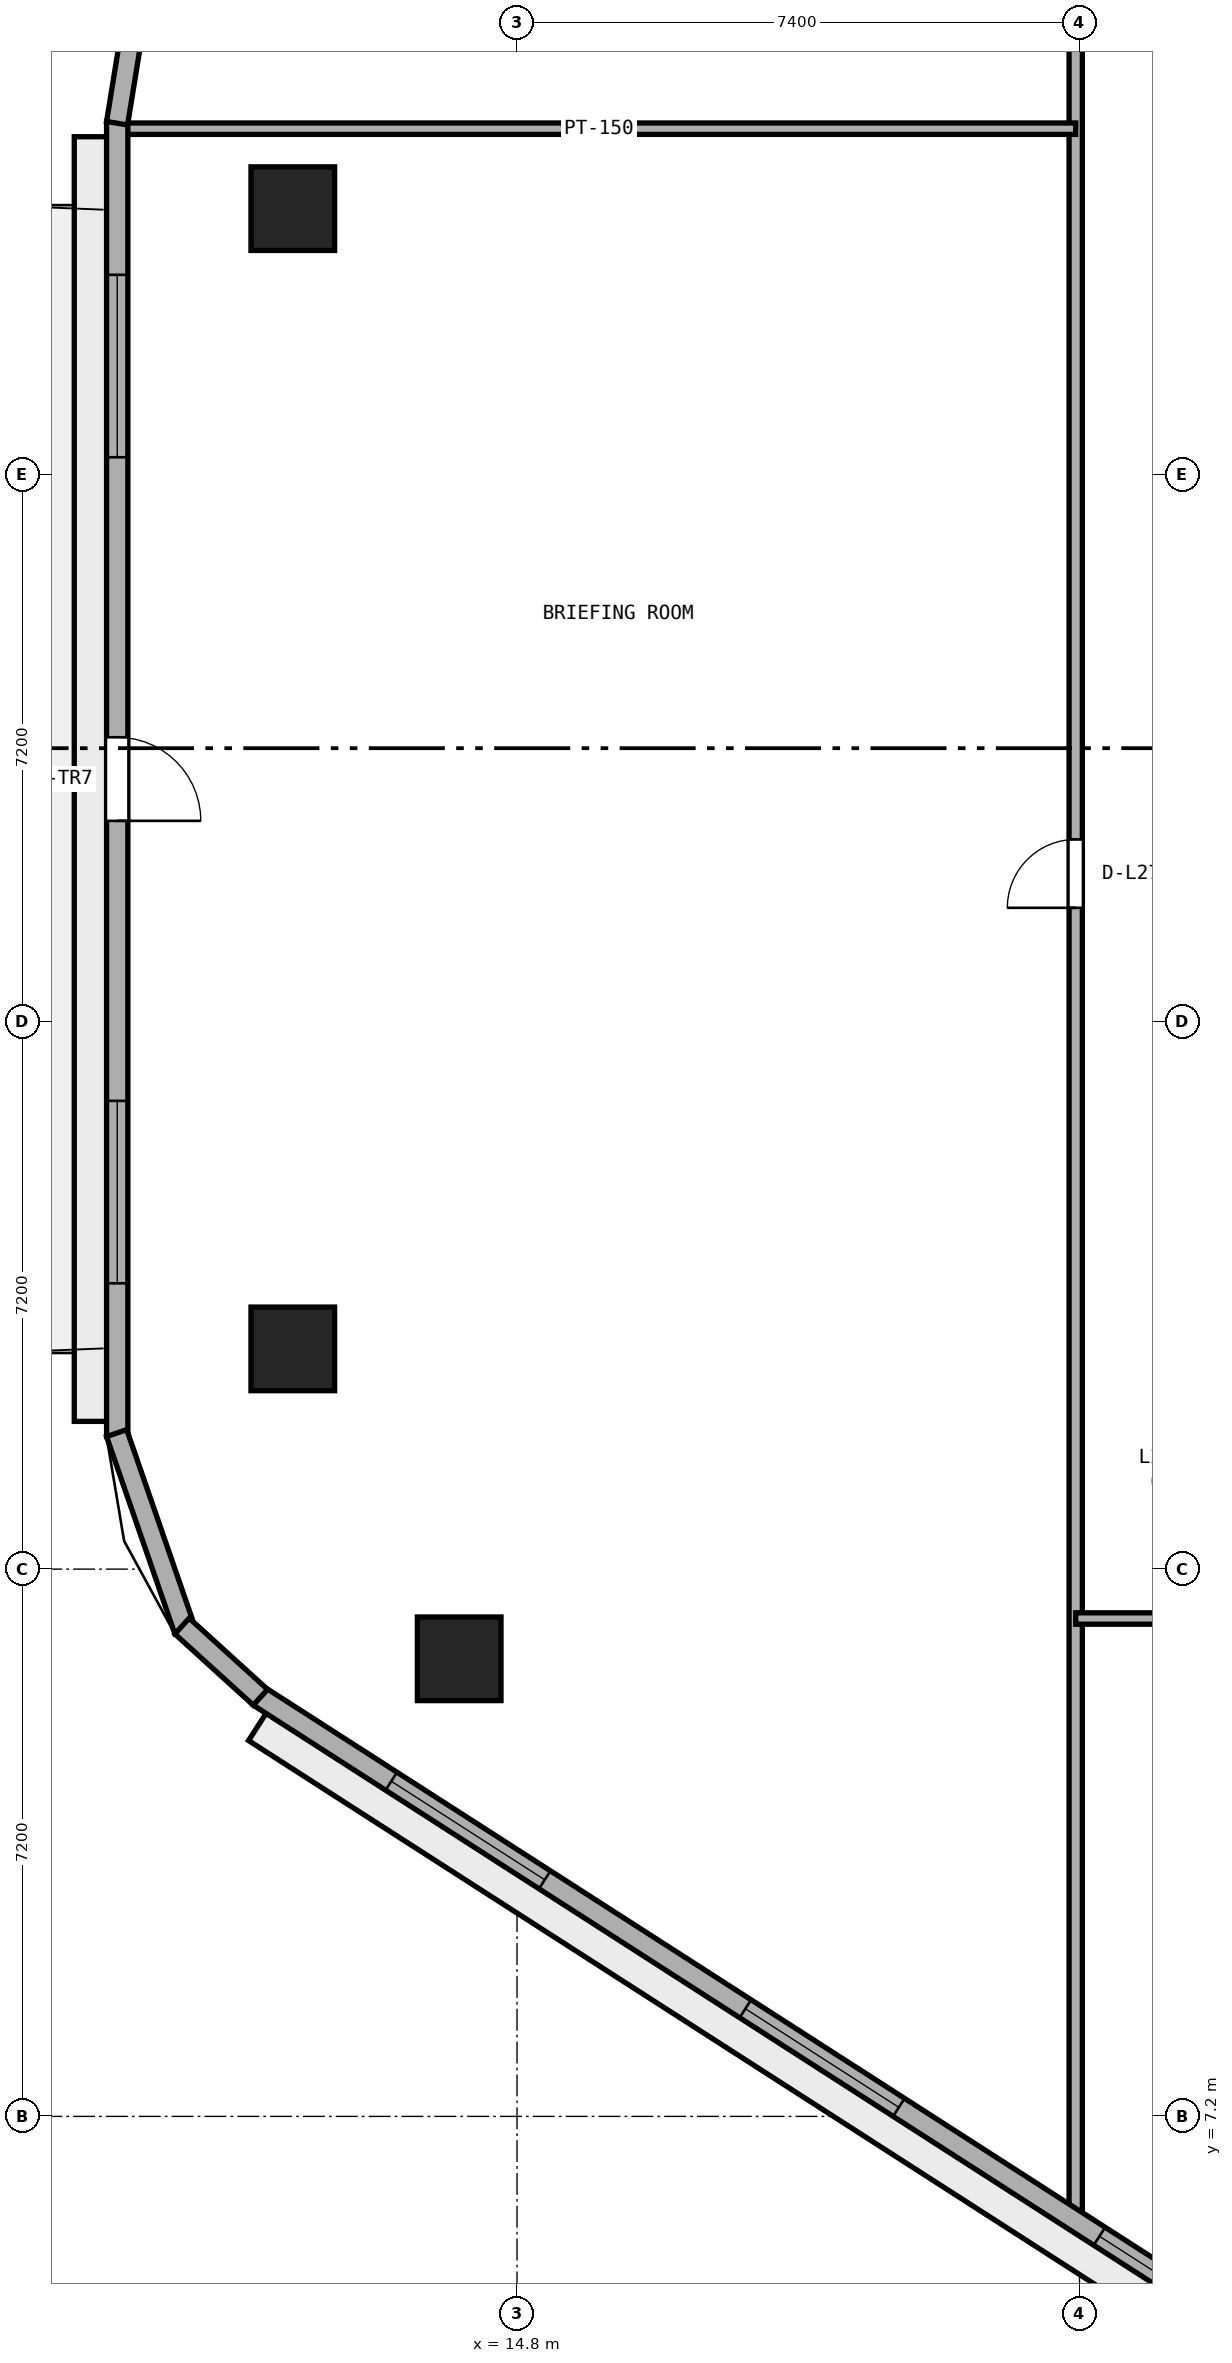
"""IFC4 building model, lengths in metres.
Left out: names, types, materials, properties, quantities, classifications, styles, units other than length and angle.
Written with IfcOpenShell. Run it as: python <this file> out.ifc"""

import sys

from ifc_helpers import new_model, si_unit, direction, frame, frame_2d, origin, origin_2d, place, context, subcontext, project, spatial, rectangle, extrude, element, fill, save


model = new_model("IFC4")
c1 = context("Model", 3, precision=1e-05, world=origin(), true_north=direction((0.0, 1.0)))
c2 = subcontext(c1, "Body", "Model", "MODEL_VIEW")
j1 = project(units=[si_unit("LENGTHUNIT", "METRE"), si_unit("PLANEANGLEUNIT", "RADIAN")], contexts=[c1])
p1 = place(None, origin())
s1 = spatial("IfcSite", under=j1, at=p1, CompositionType="ELEMENT")
p2 = place(p1, origin())
s2 = spatial("IfcBuilding", under=s1, at=p2, CompositionType="ELEMENT")
p3 = place(p2, frame((0.0, 0.0, 108.6)))
s3 = spatial("IfcBuildingStorey", under=s2, at=p3, CompositionType="ELEMENT", Elevation=108.6)
for number, where, z_axis, x_axis in (
    (1, (11.85, 32.298, 0.0), (0.0, 0.0, 1.0), (1.0, 0.0, 0.0)),
    (2, (11.85, 17.298, 0.0), (0.0, 0.0, 1.0), (1.0, 0.0, 0.0)),
    (3, (14.039, 13.22, 0.0), (0.0, 0.0, 1.0), (1.0, 0.0, 0.0)),
):
    element("IfcColumn", number, at=place(p3, frame(where, z_axis=z_axis, x_axis=x_axis)), inside=s3, PredefinedType="COLUMN", context=c2, shape_type="SweptSolid", body=[
        extrude(rectangle(XDim=1.1, YDim=1.1, at=origin_2d()), origin(), (0.0, 0.0, 1.0), 3.8),
    ])
p4 = place(p3, frame((22.15, 5.798, 0.0), z_axis=(0.0, 0.0, 1.0), x_axis=(0.0, 1.0, 0.0)))
e4 = element("IfcWall", 4, at=p4, inside=s3, PredefinedType="PARTITIONING", context=c2, shape_type="SweptSolid", body=[
    extrude(rectangle(XDim=30.852, YDim=0.175, at=frame_2d((15.426, 0.0))), origin(), (0.0, 0.0, 1.0), 3.525),
])
p5 = place(p4, frame((17.302, 0.0, 0.0)))
e5 = element("IfcOpeningElement", 5, at=p5, cuts=e4, PredefinedType="OPENING", context=c2, shape_type="SweptSolid", body=[
    extrude(rectangle(XDim=0.9, YDim=2.1, at=frame_2d((0.45, 1.05))), frame((0.0, 0.097, 0.0), z_axis=(0.0, -1.0, 0.0), x_axis=(1.0, 0.0, 0.0)), (0.0, 0.0, 1.0), 0.195),
])
p6 = place(p3, frame((22.15, 13.75, 0.0), z_axis=(0.0, 0.0, 1.0), x_axis=(1.0, 0.0, 0.0)))
e6 = element("IfcWall", 6, at=p6, inside=s3, PredefinedType="PARTITIONING", context=c2, shape_type="SweptSolid", body=[
    extrude(rectangle(XDim=29.7, YDim=0.15, at=frame_2d((14.85, 0.0))), origin(), (0.0, 0.0, 1.0), 3.525),
])
p7 = place(p6, frame((4.145, 0.0, 0.0)))
e7 = element("IfcOpeningElement", 7, at=p7, cuts=e6, PredefinedType="OPENING", context=c2, shape_type="SweptSolid", body=[
    extrude(rectangle(XDim=1.0, YDim=2.12, at=frame_2d((0.5, 1.06))), frame((0.0, 0.085, 0.0), z_axis=(0.0, -1.0, 0.0), x_axis=(1.0, 0.0, 0.0)), (0.0, 0.0, 1.0), 0.17),
])
p8 = place(p6, frame((18.755, 0.0, 0.0)))
e8 = element("IfcOpeningElement", 8, at=p8, cuts=e6, PredefinedType="OPENING", context=c2, shape_type="SweptSolid", body=[
    extrude(rectangle(XDim=1.0, YDim=2.12, at=frame_2d((0.5, 1.06))), frame((0.0, 0.085, 0.0), z_axis=(0.0, -1.0, 0.0), x_axis=(1.0, 0.0, 0.0)), (0.0, 0.0, 1.0), 0.17),
])
p9 = place(p3, frame((9.605, 33.35, 0.0), z_axis=(0.0, 0.0, 1.0), x_axis=(1.0, 0.0, 0.0)))
e9 = element("IfcWall", 9, at=p9, inside=s3, PredefinedType="PARTITIONING", context=c2, shape_type="SweptSolid", body=[
    extrude(rectangle(XDim=12.545, YDim=0.15, at=frame_2d((6.272, 0.0))), origin(), (0.0, 0.0, 1.0), 3.525),
])
p10 = place(p3, frame((9.54, 33.444, 0.0), z_axis=(0.0, 0.0, 1.0), x_axis=(0.0, -1.0, 0.0)))
e10 = element("IfcWall", 10, at=p10, inside=s3, PredefinedType="STANDARD", context=c2, shape_type="SweptSolid", body=[
    extrude(rectangle(XDim=17.301, YDim=0.28, at=frame_2d((8.65, 0.0))), origin(), (0.0, 0.0, 1.0), 3.525),
])
p11 = place(p10, frame((8.1, 0.0, 0.0)))
e11 = element("IfcOpeningElement", 11, at=p11, cuts=e10, PredefinedType="OPENING", context=c2, shape_type="SweptSolid", body=[
    extrude(rectangle(XDim=1.1, YDim=2.2, at=frame_2d((0.55, 1.1))), frame((0.0, 0.15, 0.0), z_axis=(0.0, -1.0, 0.0), x_axis=(1.0, 0.0, 0.0)), (0.0, 0.0, 1.0), 0.3),
])
p12 = place(p10, frame((2.017, 0.0, 0.9)))
e12 = element("IfcOpeningElement", 12, at=p12, cuts=e10, PredefinedType="OPENING", context=c2, shape_type="SweptSolid", body=[
    extrude(rectangle(XDim=2.4, YDim=1.75, at=frame_2d((1.2, 0.875))), frame((0.0, 0.15, 0.0), z_axis=(0.0, -1.0, 0.0), x_axis=(1.0, 0.0, 0.0)), (0.0, 0.0, 1.0), 0.3),
])
p13 = place(p10, frame((12.884, 0.0, 0.9)))
e13 = element("IfcOpeningElement", 13, at=p13, cuts=e10, PredefinedType="OPENING", context=c2, shape_type="SweptSolid", body=[
    extrude(rectangle(XDim=2.4, YDim=1.75, at=frame_2d((1.2, 0.875))), frame((0.0, 0.15, 0.0), z_axis=(0.0, -1.0, 0.0), x_axis=(1.0, 0.0, 0.0)), (0.0, 0.0, 1.0), 0.3),
])
p14 = place(p3, frame((11.405, 12.728, 0.0), z_axis=(0.0, 0.0, 1.0), x_axis=(0.841304564637, -0.540561402175, 0.0)))
e14 = element("IfcWall", 14, at=p14, inside=s3, PredefinedType="STANDARD", context=c2, shape_type="SweptSolid", body=[
    extrude(rectangle(XDim=17.612, YDim=0.28, at=frame_2d((8.806, 0.0))), origin(), (0.0, 0.0, 1.0), 3.525),
])
p15 = place(p14, frame((2.069, 0.0, 0.9)))
e15 = element("IfcOpeningElement", 15, at=p15, cuts=e14, PredefinedType="OPENING", context=c2, shape_type="SweptSolid", body=[
    extrude(rectangle(XDim=2.4, YDim=1.75, at=frame_2d((1.2, 0.875))), frame((0.0, 0.15, 0.0), z_axis=(0.0, -1.0, 0.0), x_axis=(1.0, 0.0, 0.0)), (0.0, 0.0, 1.0), 0.3),
])
p16 = place(p14, frame((7.606, 0.0, 0.9)))
e16 = element("IfcOpeningElement", 16, at=p16, cuts=e14, PredefinedType="OPENING", context=c2, shape_type="SweptSolid", body=[
    extrude(rectangle(XDim=2.4, YDim=1.75, at=frame_2d((1.2, 0.875))), frame((0.0, 0.15, 0.0), z_axis=(0.0, -1.0, 0.0), x_axis=(1.0, 0.0, 0.0)), (0.0, 0.0, 1.0), 0.3),
])
p17 = place(p14, frame((13.143, 0.0, 0.9)))
e17 = element("IfcOpeningElement", 17, at=p17, cuts=e14, PredefinedType="OPENING", context=c2, shape_type="SweptSolid", body=[
    extrude(rectangle(XDim=2.4, YDim=1.75, at=frame_2d((1.2, 0.875))), frame((0.0, 0.15, 0.0), z_axis=(0.0, -1.0, 0.0), x_axis=(1.0, 0.0, 0.0)), (0.0, 0.0, 1.0), 0.3),
])
p18 = place(p3, frame((9.753, 34.749, 0.0), z_axis=(0.0, 0.0, 1.0), x_axis=(-0.160037671962, -0.987110907423, 0.0)))
e18 = element("IfcWall", 18, at=p18, inside=s3, PredefinedType="STANDARD", context=c2, shape_type="SweptSolid", body=[
    extrude(rectangle(XDim=1.344, YDim=0.28, at=frame_2d((0.672, 0.0))), origin(), (0.0, 0.0, 1.0), 3.525),
])
p19 = place(p3, frame((9.532, 16.189, 0.0), z_axis=(0.0, 0.0, 1.0), x_axis=(0.32708309668, -0.944995580871, 0.0)))
e19 = element("IfcWall", 19, at=p19, inside=s3, PredefinedType="STANDARD", context=c2, shape_type="SweptSolid", body=[
    extrude(rectangle(XDim=2.748, YDim=0.28, at=frame_2d((1.374, 0.0))), origin(), (0.0, 0.0, 1.0), 3.525),
])
p20 = place(p3, frame((10.393, 13.651, 0.0), z_axis=(0.0, 0.0, 1.0), x_axis=(0.74003521851, -0.672568119498, 0.0)))
e20 = element("IfcWall", 20, at=p20, inside=s3, PredefinedType="STANDARD", context=c2, shape_type="SweptSolid", body=[
    extrude(rectangle(XDim=1.393, YDim=0.28, at=frame_2d((0.697, 0.0))), origin(), (0.0, 0.0, 1.0), 3.525),
])
p21 = place(p5, origin())
e21 = element("IfcDoor", 21, at=p21, inside=s3, OperationType="SINGLE_SWING_LEFT", PredefinedType="DOOR", context=c2, shape_type="SweptSolid", body=[
    extrude(rectangle(XDim=0.9, YDim=2.1, at=frame_2d((0.45, 1.05))), frame((0.0, 0.025, 0.0), z_axis=(0.0, -1.0, 0.0), x_axis=(1.0, 0.0, 0.0)), (0.0, 0.0, 1.0), 0.05),
])
fill(e5, e21)
p22 = place(p11, origin())
e22 = element("IfcDoor", 22, at=p22, inside=s3, OperationType="SINGLE_SWING_RIGHT", PredefinedType="DOOR", context=c2, shape_type="SweptSolid", body=[
    extrude(rectangle(XDim=1.1, YDim=2.2, at=frame_2d((0.55, 1.1))), frame((0.0, 0.025, 0.0), z_axis=(0.0, -1.0, 0.0), x_axis=(1.0, 0.0, 0.0)), (0.0, 0.0, 1.0), 0.05),
])
fill(e11, e22)
p23 = place(p12, origin())
e23 = element("IfcWindow", 23, at=p23, inside=s3, PartitioningType="SINGLE_PANEL", PredefinedType="WINDOW", context=c2, shape_type="SweptSolid", body=[
    extrude(rectangle(XDim=2.4, YDim=1.75, at=frame_2d((1.2, 0.875))), frame((0.0, 0.03, 0.0), z_axis=(0.0, -1.0, 0.0), x_axis=(1.0, 0.0, 0.0)), (0.0, 0.0, 1.0), 0.06),
])
fill(e12, e23)
p24 = place(p13, origin())
e24 = element("IfcWindow", 24, at=p24, inside=s3, PartitioningType="SINGLE_PANEL", PredefinedType="WINDOW", context=c2, shape_type="SweptSolid", body=[
    extrude(rectangle(XDim=2.4, YDim=1.75, at=frame_2d((1.2, 0.875))), frame((0.0, 0.03, 0.0), z_axis=(0.0, -1.0, 0.0), x_axis=(1.0, 0.0, 0.0)), (0.0, 0.0, 1.0), 0.06),
])
fill(e13, e24)
p25 = place(p15, origin())
e25 = element("IfcWindow", 25, at=p25, inside=s3, PartitioningType="SINGLE_PANEL", PredefinedType="WINDOW", context=c2, shape_type="SweptSolid", body=[
    extrude(rectangle(XDim=2.4, YDim=1.75, at=frame_2d((1.2, 0.875))), frame((0.0, 0.03, 0.0), z_axis=(0.0, -1.0, 0.0), x_axis=(1.0, 0.0, 0.0)), (0.0, 0.0, 1.0), 0.06),
])
fill(e15, e25)
p26 = place(p16, origin())
e26 = element("IfcWindow", 26, at=p26, inside=s3, PartitioningType="SINGLE_PANEL", PredefinedType="WINDOW", context=c2, shape_type="SweptSolid", body=[
    extrude(rectangle(XDim=2.4, YDim=1.75, at=frame_2d((1.2, 0.875))), frame((0.0, 0.03, 0.0), z_axis=(0.0, -1.0, 0.0), x_axis=(1.0, 0.0, 0.0)), (0.0, 0.0, 1.0), 0.06),
])
fill(e16, e26)
p27 = place(p17, origin())
e27 = element("IfcWindow", 27, at=p27, inside=s3, PartitioningType="SINGLE_PANEL", PredefinedType="WINDOW", context=c2, shape_type="SweptSolid", body=[
    extrude(rectangle(XDim=2.4, YDim=1.75, at=frame_2d((1.2, 0.875))), frame((0.0, 0.03, 0.0), z_axis=(0.0, -1.0, 0.0), x_axis=(1.0, 0.0, 0.0)), (0.0, 0.0, 1.0), 0.06),
])
fill(e17, e27)
save(model, sys.argv[1])
